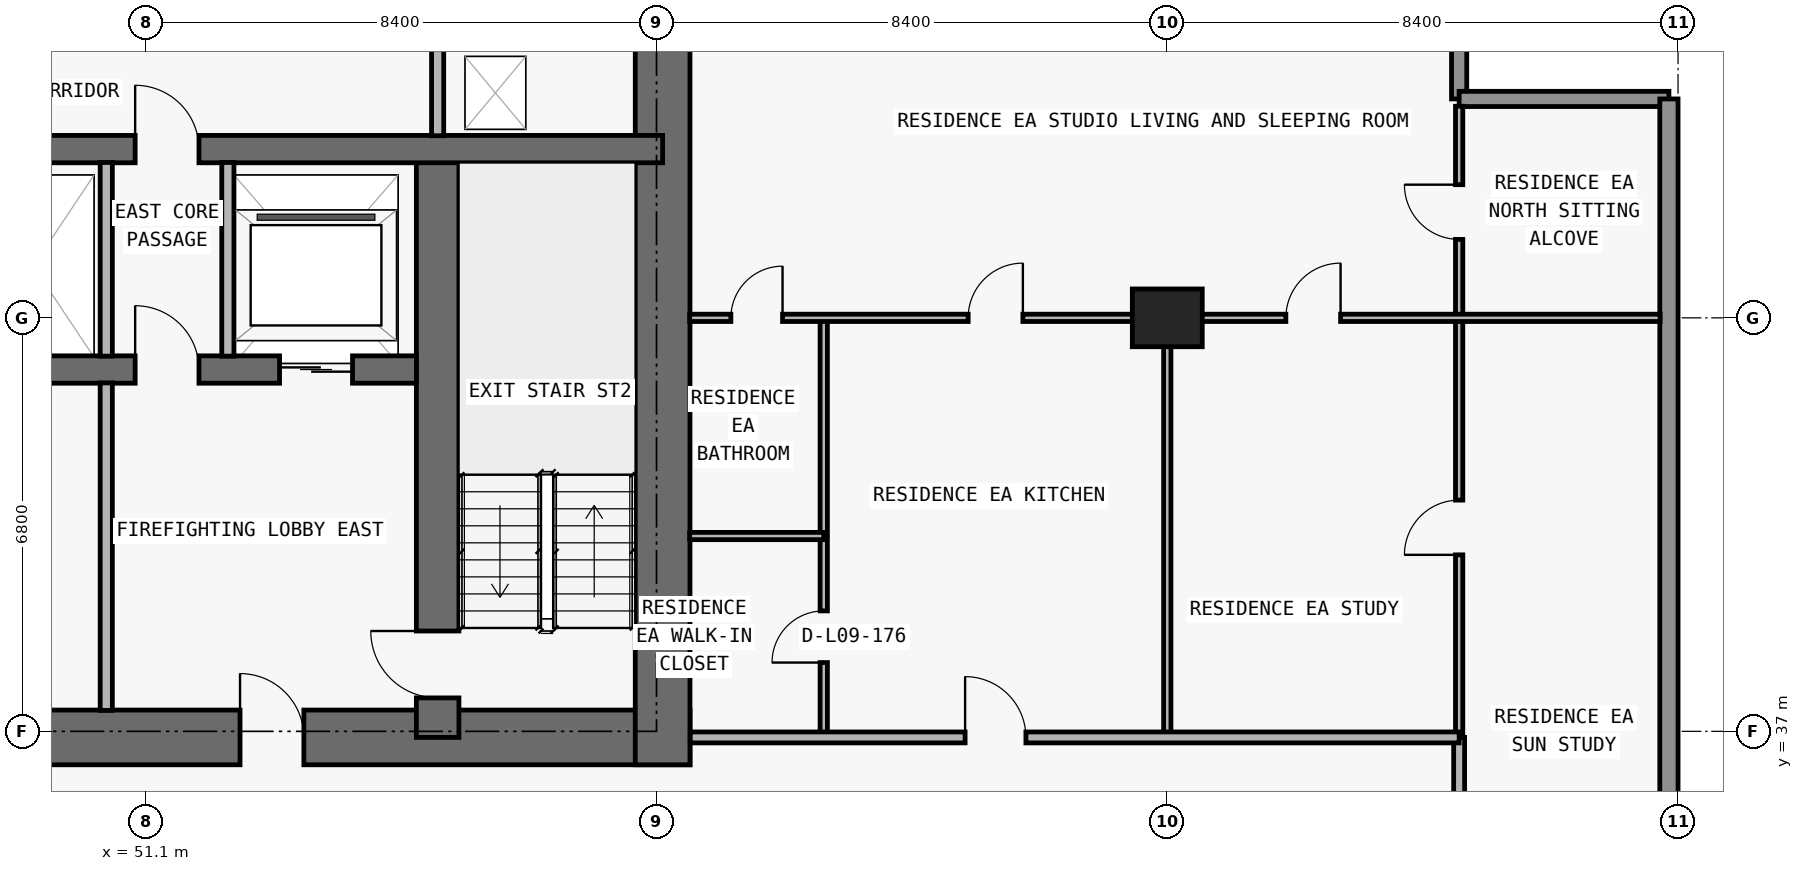
"""IFC4 building model, lengths in metres.
Left out: names, types, materials, properties, quantities, classifications, styles, units other than length and angle.
Written with IfcOpenShell. Run it as: python <this file> out.ifc"""

import sys

from ifc_helpers import new_model, si_unit, direction, frame, frame_2d, origin, origin_2d, place, context, subcontext, project, spatial, rectangle, extrude, element, fill, save


model = new_model("IFC4")
c1 = context("Model", 3, precision=1e-05, world=origin(), true_north=direction((0.0, 1.0)))
c2 = subcontext(c1, "Body", "Model", "MODEL_VIEW")
j1 = project(units=[si_unit("LENGTHUNIT", "METRE"), si_unit("PLANEANGLEUNIT", "RADIAN")], contexts=[c1])
p1 = place(None, origin())
s1 = spatial("IfcSite", under=j1, at=p1, CompositionType="ELEMENT")
p2 = place(p1, origin())
s2 = spatial("IfcBuilding", under=s1, at=p2, CompositionType="ELEMENT")
p3 = place(p2, frame((0.0, 0.0, 39.9)))
s3 = spatial("IfcBuildingStorey", under=s2, at=p3, CompositionType="ELEMENT", Elevation=39.9)
p4 = place(p3, frame((67.9, 43.8, 0.0), z_axis=(0.0, 0.0, 1.0), x_axis=(1.0, 0.0, 0.0)))
e1 = element("IfcColumn", 1, at=p4, inside=s3, PredefinedType="COLUMN", context=c2, shape_type="SweptSolid", body=[
    extrude(rectangle(XDim=1.15, YDim=0.95, at=origin_2d()), origin(), (0.0, 0.0, 1.0), 3.05),
])
p5 = place(p3, frame((17.75, 36.9, 0.0), z_axis=(0.0, 0.0, 1.0), x_axis=(1.0, 0.0, 0.0)))
e2 = element("IfcWall", 2, at=p5, inside=s3, PredefinedType="SHEAR", context=c2, shape_type="SweptSolid", body=[
    extrude(rectangle(XDim=42.3, YDim=0.9, at=frame_2d((21.15, 0.0))), origin(), (0.0, 0.0, 1.0), 3.05),
])
p6 = place(p5, frame((14.55, 0.0, 0.0)))
e3 = element("IfcOpeningElement", 3, at=p6, cuts=e2, PredefinedType="OPENING", context=c2, shape_type="SweptSolid", body=[
    extrude(rectangle(XDim=1.1, YDim=2.15, at=frame_2d((0.55, 1.075))), frame((0.0, 0.46, 0.0), z_axis=(0.0, -1.0, 0.0), x_axis=(1.0, 0.0, 0.0)), (0.0, 0.0, 1.0), 0.92),
])
p7 = place(p5, frame((6.4, 0.0, 0.0)))
e4 = element("IfcOpeningElement", 4, at=p7, cuts=e2, PredefinedType="OPENING", context=c2, shape_type="SweptSolid", body=[
    extrude(rectangle(XDim=1.05, YDim=2.15, at=frame_2d((0.525, 1.075))), frame((0.0, 0.46, 0.0), z_axis=(0.0, -1.0, 0.0), x_axis=(1.0, 0.0, 0.0)), (0.0, 0.0, 1.0), 0.92),
])
p8 = place(p5, frame((34.9, 0.0, 0.0)))
e5 = element("IfcOpeningElement", 5, at=p8, cuts=e2, PredefinedType="OPENING", context=c2, shape_type="SweptSolid", body=[
    extrude(rectangle(XDim=1.05, YDim=2.15, at=frame_2d((0.525, 1.075))), frame((0.0, 0.46, 0.0), z_axis=(0.0, -1.0, 0.0), x_axis=(1.0, 0.0, 0.0)), (0.0, 0.0, 1.0), 0.92),
])
p9 = place(p5, frame((11.012, 0.0, 0.0)))
e6 = element("IfcOpeningElement", 6, at=p9, cuts=e2, PredefinedType="OPENING", context=c2, shape_type="SweptSolid", body=[
    extrude(rectangle(XDim=1.05, YDim=2.15, at=frame_2d((0.525, 1.075))), frame((0.0, 0.46, 0.0), z_axis=(0.0, -1.0, 0.0), x_axis=(1.0, 0.0, 0.0)), (0.0, 0.0, 1.0), 0.92),
])
p10 = place(p5, frame((24.25, 0.0, 0.0)))
e7 = element("IfcOpeningElement", 7, at=p10, cuts=e2, PredefinedType="OPENING", context=c2, shape_type="SweptSolid", body=[
    extrude(rectangle(XDim=1.05, YDim=2.15, at=frame_2d((0.525, 1.075))), frame((0.0, 0.46, 0.0), z_axis=(0.0, -1.0, 0.0), x_axis=(1.0, 0.0, 0.0)), (0.0, 0.0, 1.0), 0.92),
])
p11 = place(p3, frame((59.6, 36.45, 0.0), z_axis=(0.0, 0.0, 1.0), x_axis=(0.0, 1.0, 0.0)))
e8 = element("IfcWall", 8, at=p11, inside=s3, PredefinedType="SHEAR", context=c2, shape_type="SweptSolid", body=[
    extrude(rectangle(XDim=14.15, YDim=0.9, at=frame_2d((7.075, 0.0))), origin(), (0.0, 0.0, 1.0), 3.05),
])
p12 = place(p3, frame((55.9, 36.9, 0.0), z_axis=(0.0, 0.0, 1.0), x_axis=(0.0, 1.0, 0.0)))
e9 = element("IfcWall", 9, at=p12, inside=s3, PredefinedType="SHEAR", context=c2, shape_type="SweptSolid", body=[
    extrude(rectangle(XDim=9.675, YDim=0.7, at=frame_2d((4.837, 0.0))), origin(), (0.0, 0.0, 1.0), 3.05),
])
p13 = place(p12, frame((0.65, 0.0, 0.0)))
e10 = element("IfcOpeningElement", 10, at=p13, cuts=e9, PredefinedType="OPENING", context=c2, shape_type="SweptSolid", body=[
    extrude(rectangle(XDim=1.1, YDim=2.15, at=frame_2d((0.55, 1.075))), frame((0.0, 0.36, 0.0), z_axis=(0.0, -1.0, 0.0), x_axis=(1.0, 0.0, 0.0)), (0.0, 0.0, 1.0), 0.72),
])
p14 = place(p3, frame((22.25, 42.95, 0.0), z_axis=(0.0, 0.0, 1.0), x_axis=(1.0, 0.0, 0.0)))
e11 = element("IfcWall", 11, at=p14, inside=s3, PredefinedType="SHEAR", context=c2, shape_type="SweptSolid", body=[
    extrude(rectangle(XDim=33.3, YDim=0.45, at=frame_2d((16.65, 0.0))), origin(), (0.0, 0.0, 1.0), 3.05),
])
p15 = place(p14, frame((1.05, 0.0, 0.0)))
e12 = element("IfcOpeningElement", 12, at=p15, cuts=e11, PredefinedType="OPENING", context=c2, shape_type="SweptSolid", body=[
    extrude(rectangle(XDim=1.2, YDim=2.2, at=frame_2d((0.6, 1.1))), frame((0.0, 0.235, 0.0), z_axis=(0.0, -1.0, 0.0), x_axis=(1.0, 0.0, 0.0)), (0.0, 0.0, 1.0), 0.47),
])
p16 = place(p14, frame((31.05, 0.0, 0.0)))
e13 = element("IfcOpeningElement", 13, at=p16, cuts=e11, PredefinedType="OPENING", context=c2, shape_type="SweptSolid", body=[
    extrude(rectangle(XDim=1.2, YDim=2.2, at=frame_2d((0.6, 1.1))), frame((0.0, 0.235, 0.0), z_axis=(0.0, -1.0, 0.0), x_axis=(1.0, 0.0, 0.0)), (0.0, 0.0, 1.0), 0.47),
])
p17 = place(p14, frame((13.5, 0.0, 0.0)))
e14 = element("IfcOpeningElement", 14, at=p17, cuts=e11, PredefinedType="OPENING", context=c2, shape_type="SweptSolid", body=[
    extrude(rectangle(XDim=1.1, YDim=2.2, at=frame_2d((0.55, 1.1))), frame((0.0, 0.235, 0.0), z_axis=(0.0, -1.0, 0.0), x_axis=(1.0, 0.0, 0.0)), (0.0, 0.0, 1.0), 0.47),
])
p18 = place(p14, frame((16.1, 0.0, 0.0)))
e15 = element("IfcOpeningElement", 15, at=p18, cuts=e11, PredefinedType="OPENING", context=c2, shape_type="SweptSolid", body=[
    extrude(rectangle(XDim=1.1, YDim=2.2, at=frame_2d((0.55, 1.1))), frame((0.0, 0.235, 0.0), z_axis=(0.0, -1.0, 0.0), x_axis=(1.0, 0.0, 0.0)), (0.0, 0.0, 1.0), 0.47),
])
p19 = place(p14, frame((18.7, 0.0, 0.0)))
e16 = element("IfcOpeningElement", 16, at=p19, cuts=e11, PredefinedType="OPENING", context=c2, shape_type="SweptSolid", body=[
    extrude(rectangle(XDim=1.1, YDim=2.2, at=frame_2d((0.55, 1.1))), frame((0.0, 0.235, 0.0), z_axis=(0.0, -1.0, 0.0), x_axis=(1.0, 0.0, 0.0)), (0.0, 0.0, 1.0), 0.47),
])
p20 = place(p14, frame((3.625, 0.0, 0.0)))
e17 = element("IfcOpeningElement", 17, at=p20, cuts=e11, PredefinedType="OPENING", context=c2, shape_type="SweptSolid", body=[
    extrude(rectangle(XDim=1.05, YDim=2.15, at=frame_2d((0.525, 1.075))), frame((0.0, 0.235, 0.0), z_axis=(0.0, -1.0, 0.0), x_axis=(1.0, 0.0, 0.0)), (0.0, 0.0, 1.0), 0.47),
])
p21 = place(p14, frame((28.675, 0.0, 0.0)))
e18 = element("IfcOpeningElement", 18, at=p21, cuts=e11, PredefinedType="OPENING", context=c2, shape_type="SweptSolid", body=[
    extrude(rectangle(XDim=1.05, YDim=2.15, at=frame_2d((0.525, 1.075))), frame((0.0, 0.235, 0.0), z_axis=(0.0, -1.0, 0.0), x_axis=(1.0, 0.0, 0.0)), (0.0, 0.0, 1.0), 0.47),
])
p22 = place(p3, frame((18.2, 46.575, 0.0), z_axis=(0.0, 0.0, 1.0), x_axis=(1.0, 0.0, 0.0)))
e19 = element("IfcWall", 19, at=p22, inside=s3, PredefinedType="SHEAR", context=c2, shape_type="SweptSolid", body=[
    extrude(rectangle(XDim=41.4, YDim=0.45, at=frame_2d((20.7, 0.0))), origin(), (0.0, 0.0, 1.0), 3.05),
])
p23 = place(p22, frame((7.7, 0.0, 0.0)))
e20 = element("IfcOpeningElement", 20, at=p23, cuts=e19, PredefinedType="OPENING", context=c2, shape_type="SweptSolid", body=[
    extrude(rectangle(XDim=1.0, YDim=2.2, at=frame_2d((0.5, 1.1))), frame((0.0, 0.235, 0.0), z_axis=(0.0, -1.0, 0.0), x_axis=(1.0, 0.0, 0.0)), (0.0, 0.0, 1.0), 0.47),
])
p24 = place(p22, frame((32.725, 0.0, 0.0)))
e21 = element("IfcOpeningElement", 21, at=p24, cuts=e19, PredefinedType="OPENING", context=c2, shape_type="SweptSolid", body=[
    extrude(rectangle(XDim=1.05, YDim=2.15, at=frame_2d((0.525, 1.075))), frame((0.0, 0.235, 0.0), z_axis=(0.0, -1.0, 0.0), x_axis=(1.0, 0.0, 0.0)), (0.0, 0.0, 1.0), 0.47),
])
p25 = place(p3, frame((72.7, 50.45, 0.0), z_axis=(0.0, 0.0, 1.0), x_axis=(0.0, -1.0, 0.0)))
e22 = element("IfcWall", 22, at=p25, inside=s3, PredefinedType="ELEMENTEDWALL", context=c2, shape_type="SweptSolid", body=[
    extrude(rectangle(XDim=3.05, YDim=0.25, at=frame_2d((1.525, 0.0))), origin(), (0.0, 0.0, 1.0), 3.05),
])
p26 = place(p3, frame((72.7, 47.4, 0.0), z_axis=(0.0, 0.0, 1.0), x_axis=(1.0, 0.0, 0.0)))
e23 = element("IfcWall", 23, at=p26, inside=s3, PredefinedType="ELEMENTEDWALL", context=c2, shape_type="SweptSolid", body=[
    extrude(rectangle(XDim=3.45, YDim=0.25, at=frame_2d((1.725, 0.0))), origin(), (0.0, 0.0, 1.0), 3.05),
])
p27 = place(p3, frame((76.15, 47.4, 0.0), z_axis=(0.0, 0.0, 1.0), x_axis=(0.0, -1.0, 0.0)))
e24 = element("IfcWall", 24, at=p27, inside=s3, PredefinedType="STANDARD", context=c2, shape_type="SweptSolid", body=[
    extrude(rectangle(XDim=20.6, YDim=0.3, at=frame_2d((10.3, 0.0))), origin(), (0.0, 0.0, 1.0), 3.05),
])
p28 = place(p3, frame((50.45, 37.345, 0.0), z_axis=(0.0, 0.0, 1.0), x_axis=(0.0, 1.0, 0.0)))
e25 = element("IfcWall", 25, at=p28, inside=s3, PredefinedType="PARTITIONING", context=c2, shape_type="SweptSolid", body=[
    extrude(rectangle(XDim=5.385, YDim=0.2, at=frame_2d((2.692, 0.0))), origin(), (0.0, 0.0, 1.0), 3.05),
])
for number, where, z_axis, x_axis in (
    (26, (50.45, 43.17, 0.0), (0.0, 0.0, 1.0), (0.0, 1.0, 0.0)),
    (27, (52.45, 43.17, 0.0), (0.0, 0.0, 1.0), (0.0, 1.0, 0.0)),
):
    element("IfcWall", number, at=place(p3, frame(where, z_axis=z_axis, x_axis=x_axis)), inside=s3, PredefinedType="PARTITIONING", context=c2, shape_type="SweptSolid", body=[
        extrude(rectangle(XDim=3.185, YDim=0.2, at=frame_2d((1.593, 0.0))), origin(), (0.0, 0.0, 1.0), 3.05),
    ])
p29 = place(p3, frame((55.9, 46.795, 0.0), z_axis=(0.0, 0.0, 1.0), x_axis=(0.0, 1.0, 0.0)))
e28 = element("IfcWall", 28, at=p29, inside=s3, PredefinedType="PARTITIONING", context=c2, shape_type="SweptSolid", body=[
    extrude(rectangle(XDim=3.06, YDim=0.2, at=frame_2d((1.53, 0.0))), origin(), (0.0, 0.0, 1.0), 3.05),
])
p30 = place(p3, frame((62.25, 36.9, 0.0), z_axis=(0.0, 0.0, 1.0), x_axis=(0.0, 1.0, 0.0)))
e29 = element("IfcWall", 29, at=p30, inside=s3, PredefinedType="PARTITIONING", context=c2, shape_type="SweptSolid", body=[
    extrude(rectangle(XDim=6.9, YDim=0.12, at=frame_2d((3.45, 0.0))), origin(), (0.0, 0.0, 1.0), 3.05),
])
p31 = place(p30, frame((1.231, 0.0, 0.0)))
e30 = element("IfcOpeningElement", 30, at=p31, cuts=e29, PredefinedType="OPENING", context=c2, shape_type="SweptSolid", body=[
    extrude(rectangle(XDim=0.85, YDim=2.1, at=frame_2d((0.425, 1.05))), frame((0.0, 0.07, 0.0), z_axis=(0.0, -1.0, 0.0), x_axis=(1.0, 0.0, 0.0)), (0.0, 0.0, 1.0), 0.14),
])
p32 = place(p3, frame((67.9, 36.9, 0.0), z_axis=(0.0, 0.0, 1.0), x_axis=(0.0, 1.0, 0.0)))
e31 = element("IfcWall", 31, at=p32, inside=s3, PredefinedType="PARTITIONING", context=c2, shape_type="SweptSolid", body=[
    extrude(rectangle(XDim=6.9, YDim=0.12, at=frame_2d((3.45, 0.0))), origin(), (0.0, 0.0, 1.0), 2.11),
])
p33 = place(p3, frame((72.7, 34.005, 0.0), z_axis=(0.0, 0.0, 1.0), x_axis=(0.0, 1.0, 0.0)))
e32 = element("IfcWall", 32, at=p33, inside=s3, PredefinedType="PARTITIONING", context=c2, shape_type="SweptSolid", body=[
    extrude(rectangle(XDim=2.895, YDim=0.18, at=frame_2d((1.448, 0.0))), origin(), (0.0, 0.0, 1.0), 3.05),
])
p34 = place(p3, frame((72.7, 36.905, 0.0), z_axis=(0.0, 0.0, 1.0), x_axis=(0.0, 1.0, 0.0)))
e33 = element("IfcWall", 33, at=p34, inside=s3, PredefinedType="PARTITIONING", context=c2, shape_type="SweptSolid", body=[
    extrude(rectangle(XDim=10.375, YDim=0.12, at=frame_2d((5.188, 0.0))), origin(), (0.0, 0.0, 1.0), 3.05),
])
p35 = place(p34, frame((2.998, 0.0, 0.0)))
e34 = element("IfcOpeningElement", 34, at=p35, cuts=e33, PredefinedType="OPENING", context=c2, shape_type="SweptSolid", body=[
    extrude(rectangle(XDim=0.9, YDim=2.15, at=frame_2d((0.45, 1.075))), frame((0.0, 0.07, 0.0), z_axis=(0.0, -1.0, 0.0), x_axis=(1.0, 0.0, 0.0)), (0.0, 0.0, 1.0), 0.14),
])
p36 = place(p34, frame((8.185, 0.0, 0.0)))
e35 = element("IfcOpeningElement", 35, at=p36, cuts=e33, PredefinedType="OPENING", context=c2, shape_type="SweptSolid", body=[
    extrude(rectangle(XDim=0.9, YDim=2.15, at=frame_2d((0.45, 1.075))), frame((0.0, 0.07, 0.0), z_axis=(0.0, -1.0, 0.0), x_axis=(1.0, 0.0, 0.0)), (0.0, 0.0, 1.0), 0.14),
])
p37 = place(p3, frame((60.055, 36.9, 0.0), z_axis=(0.0, 0.0, 1.0), x_axis=(1.0, 0.0, 0.0)))
e36 = element("IfcWall", 36, at=p37, inside=s3, PredefinedType="PARTITIONING", context=c2, shape_type="SweptSolid", body=[
    extrude(rectangle(XDim=12.645, YDim=0.18, at=frame_2d((6.323, 0.0))), origin(), (0.0, 0.0, 1.0), 3.05),
])
p38 = place(p37, frame((4.52, 0.0, 0.0)))
e37 = element("IfcOpeningElement", 37, at=p38, cuts=e36, PredefinedType="OPENING", context=c2, shape_type="SweptSolid", body=[
    extrude(rectangle(XDim=1.0, YDim=2.2, at=frame_2d((0.5, 1.1))), frame((0.0, 0.1, 0.0), z_axis=(0.0, -1.0, 0.0), x_axis=(1.0, 0.0, 0.0)), (0.0, 0.0, 1.0), 0.2),
])
p39 = place(p3, frame((60.045, 40.212, 0.0), z_axis=(0.0, 0.0, 1.0), x_axis=(1.0, 0.0, 0.0)))
e38 = element("IfcWall", 38, at=p39, inside=s3, PredefinedType="PARTITIONING", context=c2, shape_type="SweptSolid", body=[
    extrude(rectangle(XDim=2.205, YDim=0.12, at=frame_2d((1.103, 0.0))), origin(), (0.0, 0.0, 1.0), 3.05),
])
p40 = place(p3, frame((60.045, 43.8, 0.0), z_axis=(0.0, 0.0, 1.0), x_axis=(1.0, 0.0, 0.0)))
e39 = element("IfcWall", 39, at=p40, inside=s3, PredefinedType="PARTITIONING", context=c2, shape_type="SweptSolid", body=[
    extrude(rectangle(XDim=15.96, YDim=0.12, at=frame_2d((7.98, 0.0))), origin(), (0.0, 0.0, 1.0), 2.339),
])
p41 = place(p40, frame((9.805, 0.0, 0.0)))
e40 = element("IfcOpeningElement", 40, at=p41, cuts=e39, PredefinedType="OPENING", context=c2, shape_type="SweptSolid", body=[
    extrude(rectangle(XDim=0.9, YDim=2.15, at=frame_2d((0.45, 1.075))), frame((0.0, 0.07, 0.0), z_axis=(0.0, -1.0, 0.0), x_axis=(1.0, 0.0, 0.0)), (0.0, 0.0, 1.0), 0.14),
])
p42 = place(p40, frame((4.58, 0.0, 0.0)))
e41 = element("IfcOpeningElement", 41, at=p42, cuts=e39, PredefinedType="OPENING", context=c2, shape_type="SweptSolid", body=[
    extrude(rectangle(XDim=0.9, YDim=2.15, at=frame_2d((0.45, 1.075))), frame((0.0, 0.07, 0.0), z_axis=(0.0, -1.0, 0.0), x_axis=(1.0, 0.0, 0.0)), (0.0, 0.0, 1.0), 0.14),
])
p43 = place(p40, frame((0.677, 0.0, 0.0)))
e42 = element("IfcOpeningElement", 42, at=p43, cuts=e39, PredefinedType="OPENING", context=c2, shape_type="SweptSolid", body=[
    extrude(rectangle(XDim=0.85, YDim=2.1, at=frame_2d((0.425, 1.05))), frame((0.0, 0.07, 0.0), z_axis=(0.0, -1.0, 0.0), x_axis=(1.0, 0.0, 0.0)), (0.0, 0.0, 1.0), 0.14),
])
p44 = place(p16, origin())
e43 = element("IfcDoor", 43, at=p44, inside=s3, OperationType="DOUBLE_DOOR_SLIDING", PredefinedType="DOOR", context=c2, shape_type="SweptSolid", body=[
    extrude(rectangle(XDim=1.2, YDim=2.2, at=frame_2d((0.6, 1.1))), frame((0.0, 0.025, 0.0), z_axis=(0.0, -1.0, 0.0), x_axis=(1.0, 0.0, 0.0)), (0.0, 0.0, 1.0), 0.05),
])
fill(e13, e43)
p45 = place(p8, origin())
e44 = element("IfcDoor", 44, at=p45, inside=s3, OperationType="SINGLE_SWING_LEFT", PredefinedType="DOOR", context=c2, shape_type="SweptSolid", body=[
    extrude(rectangle(XDim=1.05, YDim=2.15, at=frame_2d((0.525, 1.075))), frame((0.0, 0.025, 0.0), z_axis=(0.0, -1.0, 0.0), x_axis=(1.0, 0.0, 0.0)), (0.0, 0.0, 1.0), 0.05),
])
fill(e5, e44)
p46 = place(p13, origin())
e45 = element("IfcDoor", 45, at=p46, inside=s3, OperationType="SINGLE_SWING_RIGHT", PredefinedType="DOOR", context=c2, shape_type="SweptSolid", body=[
    extrude(rectangle(XDim=1.1, YDim=2.15, at=frame_2d((0.55, 1.075))), frame((0.0, 0.025, 0.0), z_axis=(0.0, -1.0, 0.0), x_axis=(1.0, 0.0, 0.0)), (0.0, 0.0, 1.0), 0.05),
])
fill(e10, e45)
p47 = place(p21, origin())
e46 = element("IfcDoor", 46, at=p47, inside=s3, OperationType="SINGLE_SWING_LEFT", PredefinedType="DOOR", context=c2, shape_type="SweptSolid", body=[
    extrude(rectangle(XDim=1.05, YDim=2.15, at=frame_2d((0.525, 1.075))), frame((0.0, 0.025, 0.0), z_axis=(0.0, -1.0, 0.0), x_axis=(1.0, 0.0, 0.0)), (0.0, 0.0, 1.0), 0.05),
])
fill(e18, e46)
p48 = place(p24, origin())
e47 = element("IfcDoor", 47, at=p48, inside=s3, OperationType="SINGLE_SWING_LEFT", PredefinedType="DOOR", context=c2, shape_type="SweptSolid", body=[
    extrude(rectangle(XDim=1.05, YDim=2.15, at=frame_2d((0.525, 1.075))), frame((0.0, 0.025, 0.0), z_axis=(0.0, -1.0, 0.0), x_axis=(1.0, 0.0, 0.0)), (0.0, 0.0, 1.0), 0.05),
])
fill(e21, e47)
p49 = place(p41, origin())
e48 = element("IfcDoor", 48, at=p49, inside=s3, OperationType="SINGLE_SWING_RIGHT", PredefinedType="DOOR", context=c2, shape_type="SweptSolid", body=[
    extrude(rectangle(XDim=0.9, YDim=2.15, at=frame_2d((0.45, 1.075))), frame((0.0, 0.025, 0.0), z_axis=(0.0, -1.0, 0.0), x_axis=(1.0, 0.0, 0.0)), (0.0, 0.0, 1.0), 0.05),
])
fill(e40, e48)
p50 = place(p38, origin())
e49 = element("IfcDoor", 49, at=p50, inside=s3, OperationType="SINGLE_SWING_LEFT", PredefinedType="DOOR", context=c2, shape_type="SweptSolid", body=[
    extrude(rectangle(XDim=1.0, YDim=2.2, at=frame_2d((0.5, 1.1))), frame((0.0, 0.025, 0.0), z_axis=(0.0, -1.0, 0.0), x_axis=(1.0, 0.0, 0.0)), (0.0, 0.0, 1.0), 0.05),
])
fill(e37, e49)
p51 = place(p42, origin())
e50 = element("IfcDoor", 50, at=p51, inside=s3, OperationType="SINGLE_SWING_RIGHT", PredefinedType="DOOR", context=c2, shape_type="SweptSolid", body=[
    extrude(rectangle(XDim=0.9, YDim=2.15, at=frame_2d((0.45, 1.075))), frame((0.0, 0.025, 0.0), z_axis=(0.0, -1.0, 0.0), x_axis=(1.0, 0.0, 0.0)), (0.0, 0.0, 1.0), 0.05),
])
fill(e41, e50)
p52 = place(p31, origin())
e51 = element("IfcDoor", 51, at=p52, inside=s3, OperationType="SINGLE_SWING_LEFT", PredefinedType="DOOR", context=c2, shape_type="SweptSolid", body=[
    extrude(rectangle(XDim=0.85, YDim=2.1, at=frame_2d((0.425, 1.05))), frame((0.0, 0.025, 0.0), z_axis=(0.0, -1.0, 0.0), x_axis=(1.0, 0.0, 0.0)), (0.0, 0.0, 1.0), 0.05),
])
fill(e30, e51)
p53 = place(p43, origin())
e52 = element("IfcDoor", 52, at=p53, inside=s3, OperationType="SINGLE_SWING_RIGHT", PredefinedType="DOOR", context=c2, shape_type="SweptSolid", body=[
    extrude(rectangle(XDim=0.85, YDim=2.1, at=frame_2d((0.425, 1.05))), frame((0.0, 0.025, 0.0), z_axis=(0.0, -1.0, 0.0), x_axis=(1.0, 0.0, 0.0)), (0.0, 0.0, 1.0), 0.05),
])
fill(e42, e52)
p54 = place(p35, origin())
e53 = element("IfcDoor", 53, at=p54, inside=s3, OperationType="SINGLE_SWING_LEFT", PredefinedType="DOOR", context=c2, shape_type="SweptSolid", body=[
    extrude(rectangle(XDim=0.9, YDim=2.15, at=frame_2d((0.45, 1.075))), frame((0.0, 0.025, 0.0), z_axis=(0.0, -1.0, 0.0), x_axis=(1.0, 0.0, 0.0)), (0.0, 0.0, 1.0), 0.05),
])
fill(e34, e53)
p55 = place(p36, origin())
e54 = element("IfcDoor", 54, at=p55, inside=s3, OperationType="SINGLE_SWING_RIGHT", PredefinedType="DOOR", context=c2, shape_type="SweptSolid", body=[
    extrude(rectangle(XDim=0.9, YDim=2.15, at=frame_2d((0.45, 1.075))), frame((0.0, 0.025, 0.0), z_axis=(0.0, -1.0, 0.0), x_axis=(1.0, 0.0, 0.0)), (0.0, 0.0, 1.0), 0.05),
])
fill(e35, e54)
save(model, sys.argv[1])
